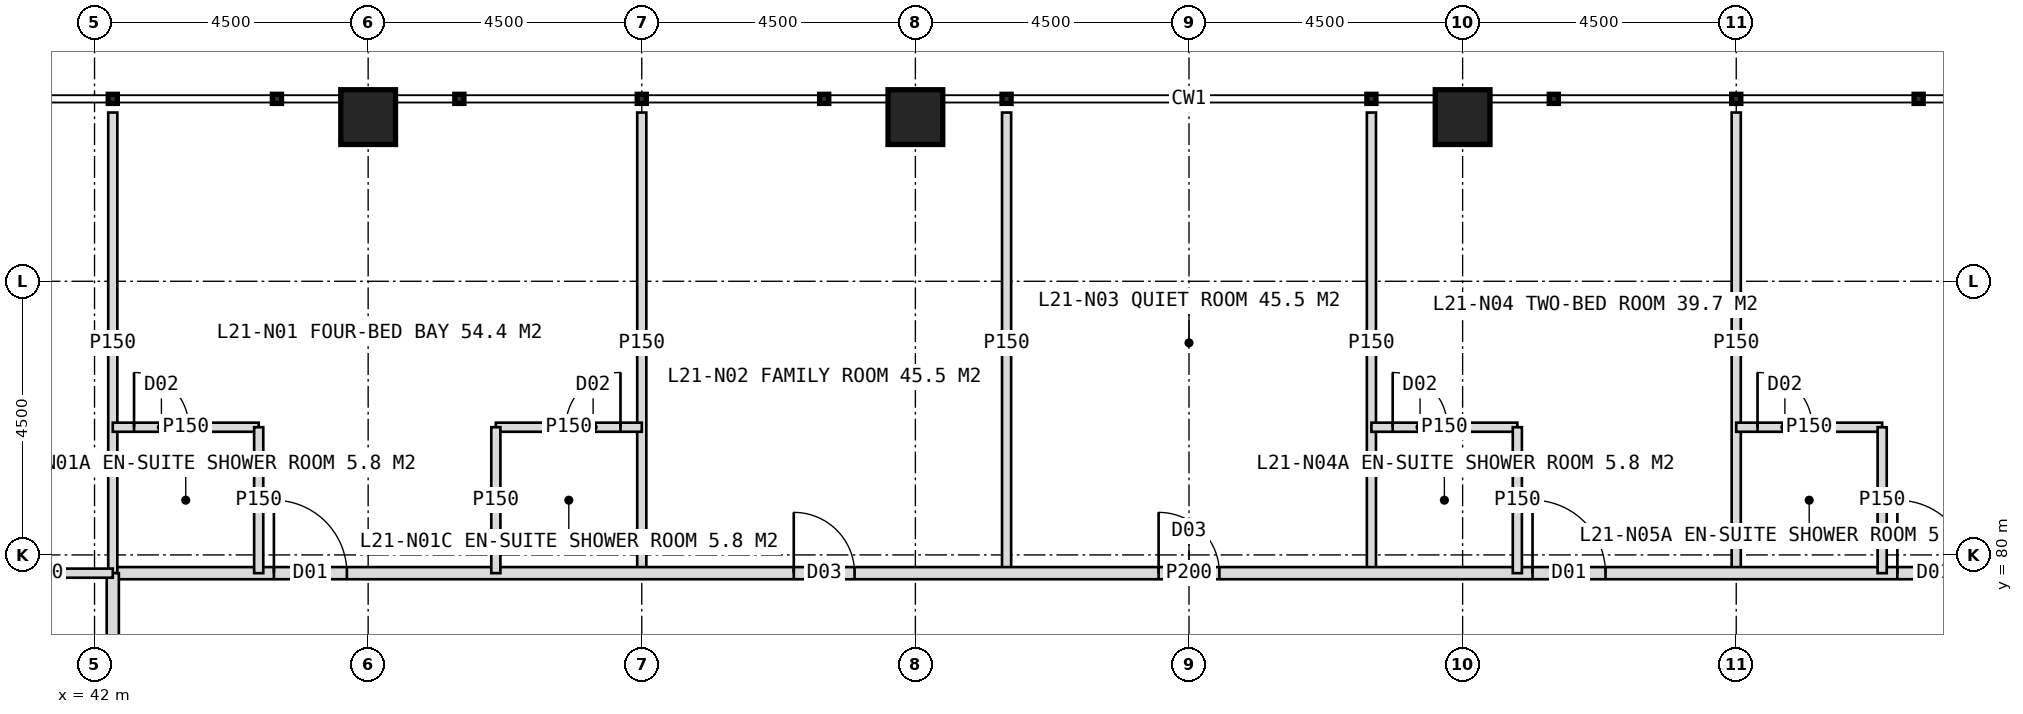
"""IFC4 building model, lengths in metres.
Left out: names, types, materials, properties, quantities, classifications, styles, units other than length and angle.
Written with IfcOpenShell. Run it as: python <this file> out.ifc"""

import sys

from ifc_helpers import new_model, si_unit, direction, frame, frame_2d, origin, origin_2d, place, context, subcontext, project, spatial, rectangle, hollow_rectangle, extrude, element, fill, save


model = new_model("IFC4")
c1 = context("Model", 3, precision=1e-05, world=origin(), true_north=direction((0.0, 1.0)))
c2 = subcontext(c1, "Body", "Model", "MODEL_VIEW")
j1 = project(units=[si_unit("LENGTHUNIT", "METRE"), si_unit("PLANEANGLEUNIT", "RADIAN")], contexts=[c1])
p1 = place(None, origin())
s1 = spatial("IfcSite", under=j1, at=p1, CompositionType="ELEMENT")
p2 = place(p1, origin())
s2 = spatial("IfcBuilding", under=s1, at=p2, CompositionType="ELEMENT")
p3 = place(p2, frame((0.0, 0.0, 91.0)))
s3 = spatial("IfcBuildingStorey", under=s2, at=p3, CompositionType="ELEMENT", Elevation=91.0)
for number, where, z_axis, x_axis in (
    (1, (46.5, 87.2, 0.0), (0.0, 0.0, 1.0), (1.0, 0.0, 0.0)),
    (2, (55.5, 87.2, 0.0), (0.0, 0.0, 1.0), (1.0, 0.0, 0.0)),
    (3, (64.5, 87.2, 0.0), (0.0, 0.0, 1.0), (1.0, 0.0, 0.0)),
):
    element("IfcColumn", number, at=place(p3, frame(where, z_axis=z_axis, x_axis=x_axis)), inside=s3, PredefinedType="COLUMN", context=c2, shape_type="SweptSolid", body=[
        extrude(hollow_rectangle(XDim=0.9, YDim=0.9, WallThickness=0.08, at=origin_2d()), origin(), (0.0, 0.0, 1.0), 4.0),
    ])
for number, where, z_axis, x_axis in (
    (4, (51.0, 79.7, 0.0), (0.0, 0.0, 1.0), (0.0, 1.0, 0.0)),
    (5, (57.0, 79.7, 0.0), (0.0, 0.0, 1.0), (0.0, 1.0, 0.0)),
    (6, (63.0, 79.7, 0.0), (0.0, 0.0, 1.0), (0.0, 1.0, 0.0)),
    (7, (69.0, 79.7, 0.0), (0.0, 0.0, 1.0), (0.0, 1.0, 0.0)),
):
    element("IfcWall", number, at=place(p3, frame(where, z_axis=z_axis, x_axis=x_axis)), inside=s3, PredefinedType="PARTITIONING", context=c2, shape_type="SweptSolid", body=[
        extrude(rectangle(XDim=7.575, YDim=0.15, at=frame_2d((3.788, 0.0))), origin(), (0.0, 0.0, 1.0), 3.75),
    ])
p4 = place(p3, frame((42.3, 79.7, 0.0), z_axis=(0.0, 0.0, 1.0), x_axis=(1.0, 0.0, 0.0)))
e8 = element("IfcWall", 8, at=p4, inside=s3, PredefinedType="PARTITIONING", context=c2, shape_type="SweptSolid", body=[
    extrude(rectangle(XDim=35.4, YDim=0.2, at=frame_2d((17.7, 0.0))), origin(), (0.0, 0.0, 1.0), 3.75),
])
p5 = place(p4, frame((2.65, 0.0, 0.0)))
e9 = element("IfcOpeningElement", 9, at=p5, cuts=e8, PredefinedType="OPENING", context=c2, shape_type="SweptSolid", body=[
    extrude(rectangle(XDim=1.2, YDim=2.2, at=frame_2d((0.6, 1.1))), frame((0.0, 0.11, 0.0), z_axis=(0.0, -1.0, 0.0), x_axis=(1.0, 0.0, 0.0)), (0.0, 0.0, 1.0), 0.22),
])
p6 = place(p4, frame((11.2, 0.0, 0.0)))
e10 = element("IfcOpeningElement", 10, at=p6, cuts=e8, PredefinedType="OPENING", context=c2, shape_type="SweptSolid", body=[
    extrude(rectangle(XDim=1.0, YDim=2.1, at=frame_2d((0.5, 1.05))), frame((0.0, 0.11, 0.0), z_axis=(0.0, -1.0, 0.0), x_axis=(1.0, 0.0, 0.0)), (0.0, 0.0, 1.0), 0.22),
])
p7 = place(p4, frame((17.2, 0.0, 0.0)))
e11 = element("IfcOpeningElement", 11, at=p7, cuts=e8, PredefinedType="OPENING", context=c2, shape_type="SweptSolid", body=[
    extrude(rectangle(XDim=1.0, YDim=2.1, at=frame_2d((0.5, 1.05))), frame((0.0, 0.11, 0.0), z_axis=(0.0, -1.0, 0.0), x_axis=(1.0, 0.0, 0.0)), (0.0, 0.0, 1.0), 0.22),
])
p8 = place(p4, frame((23.35, 0.0, 0.0)))
e12 = element("IfcOpeningElement", 12, at=p8, cuts=e8, PredefinedType="OPENING", context=c2, shape_type="SweptSolid", body=[
    extrude(rectangle(XDim=1.2, YDim=2.2, at=frame_2d((0.6, 1.1))), frame((0.0, 0.11, 0.0), z_axis=(0.0, -1.0, 0.0), x_axis=(1.0, 0.0, 0.0)), (0.0, 0.0, 1.0), 0.22),
])
p9 = place(p4, frame((29.35, 0.0, 0.0)))
e13 = element("IfcOpeningElement", 13, at=p9, cuts=e8, PredefinedType="OPENING", context=c2, shape_type="SweptSolid", body=[
    extrude(rectangle(XDim=1.2, YDim=2.2, at=frame_2d((0.6, 1.1))), frame((0.0, 0.11, 0.0), z_axis=(0.0, -1.0, 0.0), x_axis=(1.0, 0.0, 0.0)), (0.0, 0.0, 1.0), 0.22),
])
p10 = place(p3, frame((42.3, 79.7, 0.0), z_axis=(0.0, 0.0, 1.0), x_axis=(0.0, 1.0, 0.0)))
e14 = element("IfcWall", 14, at=p10, inside=s3, PredefinedType="PARTITIONING", context=c2, shape_type="SweptSolid", body=[
    extrude(rectangle(XDim=7.575, YDim=0.15, at=frame_2d((3.788, 0.0))), origin(), (0.0, 0.0, 1.0), 3.75),
])
p11 = place(p3, frame((42.3, 82.1, 0.0), z_axis=(0.0, 0.0, 1.0), x_axis=(1.0, 0.0, 0.0)))
e15 = element("IfcWall", 15, at=p11, inside=s3, PredefinedType="PARTITIONING", context=c2, shape_type="SweptSolid", body=[
    extrude(rectangle(XDim=2.4, YDim=0.15, at=frame_2d((1.2, 0.0))), origin(), (0.0, 0.0, 1.0), 3.75),
])
p12 = place(p11, frame((0.35, 0.0, 0.0)))
e16 = element("IfcOpeningElement", 16, at=p12, cuts=e15, PredefinedType="OPENING", context=c2, shape_type="SweptSolid", body=[
    extrude(rectangle(XDim=0.9, YDim=2.1, at=frame_2d((0.45, 1.05))), frame((0.0, 0.085, 0.0), z_axis=(0.0, -1.0, 0.0), x_axis=(1.0, 0.0, 0.0)), (0.0, 0.0, 1.0), 0.17),
])
p13 = place(p3, frame((44.7, 79.7, 0.0), z_axis=(0.0, 0.0, 1.0), x_axis=(0.0, 1.0, 0.0)))
e17 = element("IfcWall", 17, at=p13, inside=s3, PredefinedType="PARTITIONING", context=c2, shape_type="SweptSolid", body=[
    extrude(rectangle(XDim=2.4, YDim=0.15, at=frame_2d((1.2, 0.0))), origin(), (0.0, 0.0, 1.0), 3.75),
])
p14 = place(p3, frame((48.6, 82.1, 0.0), z_axis=(0.0, 0.0, 1.0), x_axis=(1.0, 0.0, 0.0)))
e18 = element("IfcWall", 18, at=p14, inside=s3, PredefinedType="PARTITIONING", context=c2, shape_type="SweptSolid", body=[
    extrude(rectangle(XDim=2.4, YDim=0.15, at=frame_2d((1.2, 0.0))), origin(), (0.0, 0.0, 1.0), 3.75),
])
p15 = place(p14, frame((1.15, 0.0, 0.0)))
e19 = element("IfcOpeningElement", 19, at=p15, cuts=e18, PredefinedType="OPENING", context=c2, shape_type="SweptSolid", body=[
    extrude(rectangle(XDim=0.9, YDim=2.1, at=frame_2d((0.45, 1.05))), frame((0.0, 0.085, 0.0), z_axis=(0.0, -1.0, 0.0), x_axis=(1.0, 0.0, 0.0)), (0.0, 0.0, 1.0), 0.17),
])
p16 = place(p3, frame((48.6, 79.7, 0.0), z_axis=(0.0, 0.0, 1.0), x_axis=(0.0, 1.0, 0.0)))
e20 = element("IfcWall", 20, at=p16, inside=s3, PredefinedType="PARTITIONING", context=c2, shape_type="SweptSolid", body=[
    extrude(rectangle(XDim=2.4, YDim=0.15, at=frame_2d((1.2, 0.0))), origin(), (0.0, 0.0, 1.0), 3.75),
])
p17 = place(p3, frame((63.0, 82.1, 0.0), z_axis=(0.0, 0.0, 1.0), x_axis=(1.0, 0.0, 0.0)))
e21 = element("IfcWall", 21, at=p17, inside=s3, PredefinedType="PARTITIONING", context=c2, shape_type="SweptSolid", body=[
    extrude(rectangle(XDim=2.4, YDim=0.15, at=frame_2d((1.2, 0.0))), origin(), (0.0, 0.0, 1.0), 3.75),
])
p18 = place(p17, frame((0.35, 0.0, 0.0)))
e22 = element("IfcOpeningElement", 22, at=p18, cuts=e21, PredefinedType="OPENING", context=c2, shape_type="SweptSolid", body=[
    extrude(rectangle(XDim=0.9, YDim=2.1, at=frame_2d((0.45, 1.05))), frame((0.0, 0.085, 0.0), z_axis=(0.0, -1.0, 0.0), x_axis=(1.0, 0.0, 0.0)), (0.0, 0.0, 1.0), 0.17),
])
p19 = place(p3, frame((65.4, 79.7, 0.0), z_axis=(0.0, 0.0, 1.0), x_axis=(0.0, 1.0, 0.0)))
e23 = element("IfcWall", 23, at=p19, inside=s3, PredefinedType="PARTITIONING", context=c2, shape_type="SweptSolid", body=[
    extrude(rectangle(XDim=2.4, YDim=0.15, at=frame_2d((1.2, 0.0))), origin(), (0.0, 0.0, 1.0), 3.75),
])
p20 = place(p3, frame((69.0, 82.1, 0.0), z_axis=(0.0, 0.0, 1.0), x_axis=(1.0, 0.0, 0.0)))
e24 = element("IfcWall", 24, at=p20, inside=s3, PredefinedType="PARTITIONING", context=c2, shape_type="SweptSolid", body=[
    extrude(rectangle(XDim=2.4, YDim=0.15, at=frame_2d((1.2, 0.0))), origin(), (0.0, 0.0, 1.0), 3.75),
])
p21 = place(p20, frame((0.35, 0.0, 0.0)))
e25 = element("IfcOpeningElement", 25, at=p21, cuts=e24, PredefinedType="OPENING", context=c2, shape_type="SweptSolid", body=[
    extrude(rectangle(XDim=0.9, YDim=2.1, at=frame_2d((0.45, 1.05))), frame((0.0, 0.085, 0.0), z_axis=(0.0, -1.0, 0.0), x_axis=(1.0, 0.0, 0.0)), (0.0, 0.0, 1.0), 0.17),
])
p22 = place(p3, frame((71.4, 79.7, 0.0), z_axis=(0.0, 0.0, 1.0), x_axis=(0.0, 1.0, 0.0)))
e26 = element("IfcWall", 26, at=p22, inside=s3, PredefinedType="PARTITIONING", context=c2, shape_type="SweptSolid", body=[
    extrude(rectangle(XDim=2.4, YDim=0.15, at=frame_2d((1.2, 0.0))), origin(), (0.0, 0.0, 1.0), 3.75),
])
p23 = place(p3, frame((42.3, 44.3, 0.0), z_axis=(0.0, 0.0, 1.0), x_axis=(0.0, 1.0, 0.0)))
e27 = element("IfcWall", 27, at=p23, inside=s3, PredefinedType="PARTITIONING", context=c2, shape_type="SweptSolid", body=[
    extrude(rectangle(XDim=35.4, YDim=0.2, at=frame_2d((17.7, 0.0))), origin(), (0.0, 0.0, 1.0), 3.75),
])
p24 = place(p23, frame((2.65, 0.0, 0.0)))
e28 = element("IfcOpeningElement", 28, at=p24, cuts=e27, PredefinedType="OPENING", context=c2, shape_type="SweptSolid", body=[
    extrude(rectangle(XDim=1.2, YDim=2.2, at=frame_2d((0.6, 1.1))), frame((0.0, 0.11, 0.0), z_axis=(0.0, -1.0, 0.0), x_axis=(1.0, 0.0, 0.0)), (0.0, 0.0, 1.0), 0.22),
])
p25 = place(p23, frame((11.35, 0.0, 0.0)))
e29 = element("IfcOpeningElement", 29, at=p25, cuts=e27, PredefinedType="OPENING", context=c2, shape_type="SweptSolid", body=[
    extrude(rectangle(XDim=1.2, YDim=2.2, at=frame_2d((0.6, 1.1))), frame((0.0, 0.11, 0.0), z_axis=(0.0, -1.0, 0.0), x_axis=(1.0, 0.0, 0.0)), (0.0, 0.0, 1.0), 0.22),
])
p26 = place(p23, frame((20.35, 0.0, 0.0)))
e30 = element("IfcOpeningElement", 30, at=p26, cuts=e27, PredefinedType="OPENING", context=c2, shape_type="SweptSolid", body=[
    extrude(rectangle(XDim=1.2, YDim=2.2, at=frame_2d((0.6, 1.1))), frame((0.0, 0.11, 0.0), z_axis=(0.0, -1.0, 0.0), x_axis=(1.0, 0.0, 0.0)), (0.0, 0.0, 1.0), 0.22),
])
p27 = place(p23, frame((26.35, 0.0, 0.0)))
e31 = element("IfcOpeningElement", 31, at=p27, cuts=e27, PredefinedType="OPENING", context=c2, shape_type="SweptSolid", body=[
    extrude(rectangle(XDim=1.2, YDim=2.2, at=frame_2d((0.6, 1.1))), frame((0.0, 0.11, 0.0), z_axis=(0.0, -1.0, 0.0), x_axis=(1.0, 0.0, 0.0)), (0.0, 0.0, 1.0), 0.22),
])
p28 = place(p23, frame((30.85, 0.0, 0.0)))
e32 = element("IfcOpeningElement", 32, at=p28, cuts=e27, PredefinedType="OPENING", context=c2, shape_type="SweptSolid", body=[
    extrude(rectangle(XDim=1.2, YDim=2.2, at=frame_2d((0.6, 1.1))), frame((0.0, 0.11, 0.0), z_axis=(0.0, -1.0, 0.0), x_axis=(1.0, 0.0, 0.0)), (0.0, 0.0, 1.0), 0.22),
])
p29 = place(p3, frame((42.3, 79.7, 0.0), z_axis=(0.0, 0.0, 1.0), x_axis=(-1.0, 0.0, 0.0)))
e33 = element("IfcWall", 33, at=p29, inside=s3, PredefinedType="PARTITIONING", context=c2, shape_type="SweptSolid", body=[
    extrude(rectangle(XDim=2.4, YDim=0.15, at=frame_2d((1.2, 0.0))), origin(), (0.0, 0.0, 1.0), 3.75),
])
p30 = place(p5, origin())
e34 = element("IfcDoor", 34, at=p30, inside=s3, OperationType="SINGLE_SWING_LEFT", PredefinedType="DOOR", context=c2, shape_type="SweptSolid", body=[
    extrude(rectangle(XDim=1.2, YDim=2.2, at=frame_2d((0.6, 1.1))), frame((0.0, 0.025, 0.0), z_axis=(0.0, -1.0, 0.0), x_axis=(1.0, 0.0, 0.0)), (0.0, 0.0, 1.0), 0.05),
])
fill(e9, e34)
p31 = place(p12, origin())
e35 = element("IfcDoor", 35, at=p31, inside=s3, OperationType="SINGLE_SWING_LEFT", PredefinedType="DOOR", context=c2, shape_type="SweptSolid", body=[
    extrude(rectangle(XDim=0.9, YDim=2.1, at=frame_2d((0.45, 1.05))), frame((0.0, 0.025, 0.0), z_axis=(0.0, -1.0, 0.0), x_axis=(1.0, 0.0, 0.0)), (0.0, 0.0, 1.0), 0.05),
])
fill(e16, e35)
p32 = place(p15, origin())
e36 = element("IfcDoor", 36, at=p32, inside=s3, OperationType="SINGLE_SWING_RIGHT", PredefinedType="DOOR", context=c2, shape_type="SweptSolid", body=[
    extrude(rectangle(XDim=0.9, YDim=2.1, at=frame_2d((0.45, 1.05))), frame((0.0, 0.025, 0.0), z_axis=(0.0, -1.0, 0.0), x_axis=(1.0, 0.0, 0.0)), (0.0, 0.0, 1.0), 0.05),
])
fill(e19, e36)
p33 = place(p6, origin())
e37 = element("IfcDoor", 37, at=p33, inside=s3, OperationType="SINGLE_SWING_LEFT", PredefinedType="DOOR", context=c2, shape_type="SweptSolid", body=[
    extrude(rectangle(XDim=1.0, YDim=2.1, at=frame_2d((0.5, 1.05))), frame((0.0, 0.025, 0.0), z_axis=(0.0, -1.0, 0.0), x_axis=(1.0, 0.0, 0.0)), (0.0, 0.0, 1.0), 0.05),
])
fill(e10, e37)
p34 = place(p7, origin())
e38 = element("IfcDoor", 38, at=p34, inside=s3, OperationType="SINGLE_SWING_LEFT", PredefinedType="DOOR", context=c2, shape_type="SweptSolid", body=[
    extrude(rectangle(XDim=1.0, YDim=2.1, at=frame_2d((0.5, 1.05))), frame((0.0, 0.025, 0.0), z_axis=(0.0, -1.0, 0.0), x_axis=(1.0, 0.0, 0.0)), (0.0, 0.0, 1.0), 0.05),
])
fill(e11, e38)
p35 = place(p8, origin())
e39 = element("IfcDoor", 39, at=p35, inside=s3, OperationType="SINGLE_SWING_LEFT", PredefinedType="DOOR", context=c2, shape_type="SweptSolid", body=[
    extrude(rectangle(XDim=1.2, YDim=2.2, at=frame_2d((0.6, 1.1))), frame((0.0, 0.025, 0.0), z_axis=(0.0, -1.0, 0.0), x_axis=(1.0, 0.0, 0.0)), (0.0, 0.0, 1.0), 0.05),
])
fill(e12, e39)
p36 = place(p18, origin())
e40 = element("IfcDoor", 40, at=p36, inside=s3, OperationType="SINGLE_SWING_LEFT", PredefinedType="DOOR", context=c2, shape_type="SweptSolid", body=[
    extrude(rectangle(XDim=0.9, YDim=2.1, at=frame_2d((0.45, 1.05))), frame((0.0, 0.025, 0.0), z_axis=(0.0, -1.0, 0.0), x_axis=(1.0, 0.0, 0.0)), (0.0, 0.0, 1.0), 0.05),
])
fill(e22, e40)
p37 = place(p9, origin())
e41 = element("IfcDoor", 41, at=p37, inside=s3, OperationType="SINGLE_SWING_LEFT", PredefinedType="DOOR", context=c2, shape_type="SweptSolid", body=[
    extrude(rectangle(XDim=1.2, YDim=2.2, at=frame_2d((0.6, 1.1))), frame((0.0, 0.025, 0.0), z_axis=(0.0, -1.0, 0.0), x_axis=(1.0, 0.0, 0.0)), (0.0, 0.0, 1.0), 0.05),
])
fill(e13, e41)
p38 = place(p21, origin())
e42 = element("IfcDoor", 42, at=p38, inside=s3, OperationType="SINGLE_SWING_LEFT", PredefinedType="DOOR", context=c2, shape_type="SweptSolid", body=[
    extrude(rectangle(XDim=0.9, YDim=2.1, at=frame_2d((0.45, 1.05))), frame((0.0, 0.025, 0.0), z_axis=(0.0, -1.0, 0.0), x_axis=(1.0, 0.0, 0.0)), (0.0, 0.0, 1.0), 0.05),
])
fill(e25, e42)
save(model, sys.argv[1])
